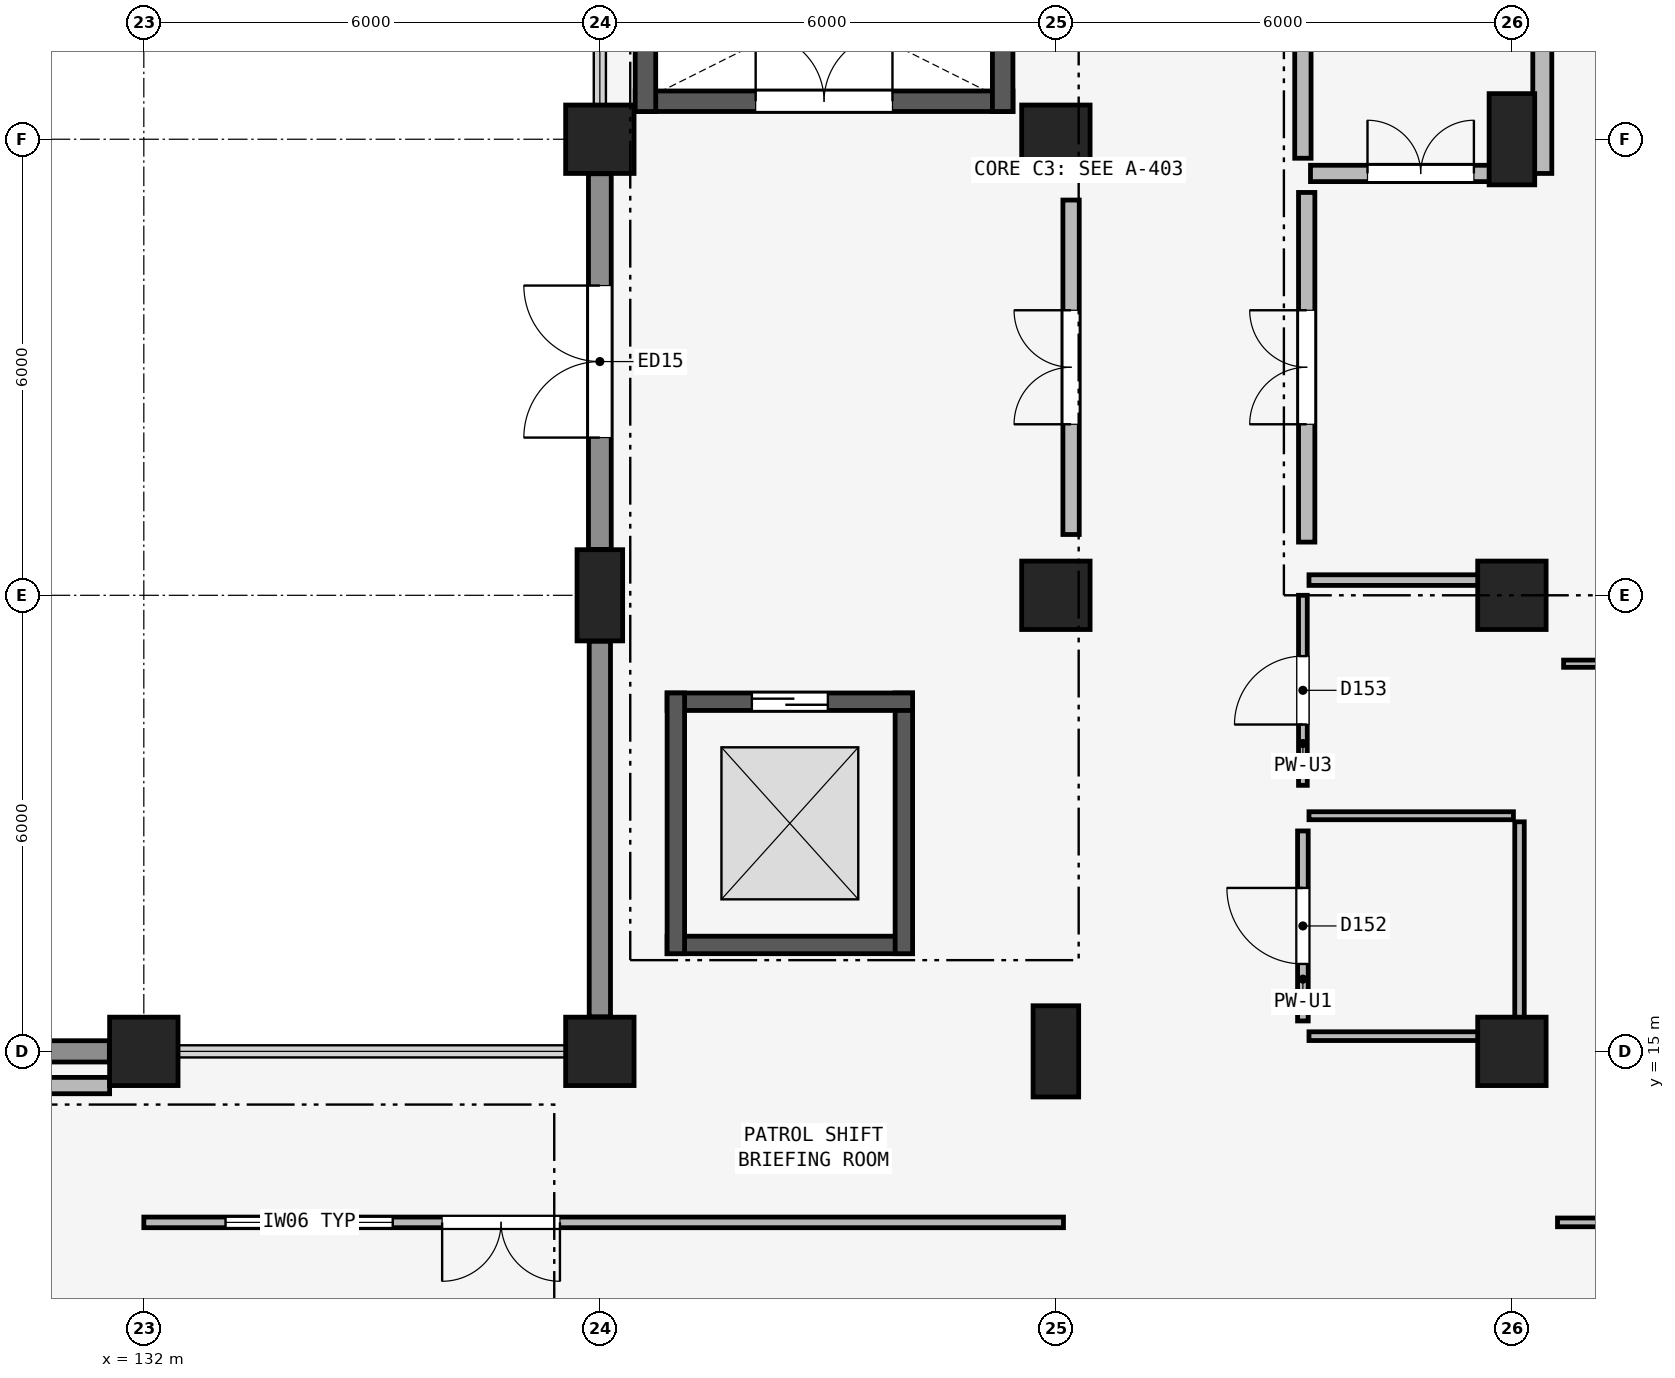
"""IFC4 building model, lengths in metres.
Left out: names, types, materials, properties, quantities, classifications, styles, units other than length and angle.
Written with IfcOpenShell. Run it as: python <this file> out.ifc"""

import sys

from ifc_helpers import new_model, si_unit, direction, frame, frame_2d, origin, origin_2d, place, context, subcontext, project, spatial, rectangle, extrude, element, fill, save


model = new_model("IFC4")
c1 = context("Model", 3, precision=1e-05, world=origin(), true_north=direction((0.0, 1.0)))
c2 = subcontext(c1, "Body", "Model", "MODEL_VIEW")
j1 = project(units=[si_unit("LENGTHUNIT", "METRE"), si_unit("PLANEANGLEUNIT", "RADIAN")], contexts=[c1])
p1 = place(None, origin())
s1 = spatial("IfcSite", under=j1, at=p1, CompositionType="ELEMENT")
p2 = place(p1, origin())
s2 = spatial("IfcBuilding", under=s1, at=p2, CompositionType="ELEMENT")
p3 = place(p2, origin())
s3 = spatial("IfcBuildingStorey", under=s2, at=p3, CompositionType="ELEMENT", Elevation=0.0)
for number, where, z_axis, x_axis in (
    (1, (132.0, 15.0, 0.0), (0.0, 0.0, 1.0), (1.0, 0.0, 0.0)),
    (2, (138.0, 15.0, 0.0), (0.0, 0.0, 1.0), (1.0, 0.0, 0.0)),
):
    element("IfcColumn", number, at=place(p3, frame(where, z_axis=z_axis, x_axis=x_axis)), inside=s3, PredefinedType="COLUMN", context=c2, shape_type="SweptSolid", body=[
        extrude(rectangle(XDim=0.9, YDim=0.9, at=origin_2d()), origin(), (0.0, 0.0, 1.0), 4.8),
    ])
p4 = place(p3, frame((138.0, 21.0, 0.0), z_axis=(0.0, 0.0, 1.0), x_axis=(1.0, 0.0, 0.0)))
e3 = element("IfcColumn", 3, at=p4, inside=s3, PredefinedType="COLUMN", context=c2, shape_type="SweptSolid", body=[
    extrude(rectangle(XDim=0.6, YDim=1.2, at=origin_2d()), origin(), (0.0, 0.0, 1.0), 4.8),
])
p5 = place(p3, frame((138.0, 27.0, 0.0), z_axis=(0.0, 0.0, 1.0), x_axis=(1.0, 0.0, 0.0)))
e4 = element("IfcColumn", 4, at=p5, inside=s3, PredefinedType="COLUMN", context=c2, shape_type="SweptSolid", body=[
    extrude(rectangle(XDim=0.9, YDim=0.9, at=origin_2d()), origin(), (0.0, 0.0, 1.0), 4.8),
])
p6 = place(p3, frame((144.0, 15.0, 0.0), z_axis=(0.0, 0.0, 1.0), x_axis=(1.0, 0.0, 0.0)))
e5 = element("IfcColumn", 5, at=p6, inside=s3, PredefinedType="COLUMN", context=c2, shape_type="SweptSolid", body=[
    extrude(rectangle(XDim=0.6, YDim=1.2, at=origin_2d()), origin(), (0.0, 0.0, 1.0), 4.8),
])
for number, where, z_axis, x_axis in (
    (6, (144.0, 21.0, 0.0), (0.0, 0.0, 1.0), (1.0, 0.0, 0.0)),
    (7, (144.0, 27.0, 0.0), (0.0, 0.0, 1.0), (1.0, 0.0, 0.0)),
    (8, (150.0, 15.0, 0.0), (0.0, 0.0, 1.0), (1.0, 0.0, 0.0)),
    (9, (150.0, 21.0, 0.0), (0.0, 0.0, 1.0), (1.0, 0.0, 0.0)),
):
    element("IfcColumn", number, at=place(p3, frame(where, z_axis=z_axis, x_axis=x_axis)), inside=s3, PredefinedType="COLUMN", context=c2, shape_type="SweptSolid", body=[
        extrude(rectangle(XDim=0.9, YDim=0.9, at=origin_2d()), origin(), (0.0, 0.0, 1.0), 4.8),
    ])
p7 = place(p3, frame((150.0, 27.0, 0.0), z_axis=(0.0, 0.0, 1.0), x_axis=(1.0, 0.0, 0.0)))
e10 = element("IfcColumn", 10, at=p7, inside=s3, PredefinedType="COLUMN", context=c2, shape_type="SweptSolid", body=[
    extrude(rectangle(XDim=0.6, YDim=1.2, at=origin_2d()), origin(), (0.0, 0.0, 1.0), 4.8),
])
p8 = place(p3, frame((126.304, 15.0, 0.0), z_axis=(0.0, 0.0, 1.0), x_axis=(1.0, 0.0, 0.0)))
e11 = element("IfcWall", 11, at=p8, inside=s3, PredefinedType="SOLIDWALL", context=c2, shape_type="SweptSolid", body=[
    extrude(rectangle(XDim=5.242, YDim=0.28, at=frame_2d((2.621, 0.0))), origin(), (0.0, 0.0, 1.0), 4.04),
])
p9 = place(p3, frame((138.0, 15.454, 0.0), z_axis=(0.0, 0.0, 1.0), x_axis=(0.0, 1.0, 0.0)))
e12 = element("IfcWall", 12, at=p9, inside=s3, PredefinedType="SOLIDWALL", context=c2, shape_type="SweptSolid", body=[
    extrude(rectangle(XDim=4.942, YDim=0.28, at=frame_2d((2.471, 0.0))), origin(), (0.0, 0.0, 1.0), 4.083),
])
p10 = place(p3, frame((138.0, 21.604, 0.0), z_axis=(0.0, 0.0, 1.0), x_axis=(0.0, 1.0, 0.0)))
e13 = element("IfcWall", 13, at=p10, inside=s3, PredefinedType="SOLIDWALL", context=c2, shape_type="SweptSolid", body=[
    extrude(rectangle(XDim=4.942, YDim=0.3, at=frame_2d((2.471, 0.0))), origin(), (0.0, 0.0, 1.0), 4.166),
])
p11 = place(p10, frame((1.471, 0.0, 0.0)))
e14 = element("IfcOpeningElement", 14, at=p11, cuts=e13, PredefinedType="OPENING", context=c2, shape_type="SweptSolid", body=[
    extrude(rectangle(XDim=2.0, YDim=2.4, at=frame_2d((1.0, 1.2))), frame((0.0, 0.16, 0.0), z_axis=(0.0, -1.0, 0.0), x_axis=(1.0, 0.0, 0.0)), (0.0, 0.0, 1.0), 0.32),
])
p12 = place(p3, frame((147.3, 21.7, 0.0), z_axis=(0.0, 0.0, 1.0), x_axis=(0.0, 1.0, 0.0)))
e15 = element("IfcWall", 15, at=p12, inside=s3, PredefinedType="PARTITIONING", context=c2, shape_type="SweptSolid", body=[
    extrude(rectangle(XDim=4.6, YDim=0.215, at=frame_2d((2.3, 0.0))), origin(), (0.0, 0.0, 1.0), 4.49),
])
p13 = place(p12, frame((1.55, 0.0, 0.0)))
e16 = element("IfcOpeningElement", 16, at=p13, cuts=e15, PredefinedType="OPENING", context=c2, shape_type="SweptSolid", body=[
    extrude(rectangle(XDim=1.5, YDim=2.15, at=frame_2d((0.75, 1.075))), frame((0.0, 0.117, 0.0), z_axis=(0.0, -1.0, 0.0), x_axis=(1.0, 0.0, 0.0)), (0.0, 0.0, 1.0), 0.235),
])
p14 = place(p3, frame((150.4, 26.55, 0.0), z_axis=(0.0, 0.0, 1.0), x_axis=(0.0, 1.0, 0.0)))
e17 = element("IfcWall", 17, at=p14, inside=s3, PredefinedType="PARTITIONING", context=c2, shape_type="SweptSolid", body=[
    extrude(rectangle(XDim=5.05, YDim=0.25, at=frame_2d((2.525, 0.0))), origin(), (0.0, 0.0, 1.0), 3.89),
])
p15 = place(p14, frame((1.775, 0.0, 0.0)))
e18 = element("IfcOpeningElement", 18, at=p15, cuts=e17, PredefinedType="OPENING", context=c2, shape_type="SweptSolid", body=[
    extrude(rectangle(XDim=1.5, YDim=2.15, at=frame_2d((0.75, 1.075))), frame((0.0, 0.135, 0.0), z_axis=(0.0, -1.0, 0.0), x_axis=(1.0, 0.0, 0.0)), (0.0, 0.0, 1.0), 0.27),
])
p16 = place(p3, frame((138.465, 27.5, 0.0), z_axis=(0.0, 0.0, 1.0), x_axis=(1.0, 0.0, 0.0)))
e19 = element("IfcWall", 19, at=p16, inside=s3, PredefinedType="SHEAR", context=c2, shape_type="SweptSolid", body=[
    extrude(rectangle(XDim=4.97, YDim=0.27, at=frame_2d((2.485, 0.0))), origin(), (0.0, 0.0, 1.0), 4.66),
])
p17 = place(p16, frame((1.585, 0.0, 0.0)))
e20 = element("IfcOpeningElement", 20, at=p17, cuts=e19, PredefinedType="OPENING", context=c2, shape_type="SweptSolid", body=[
    extrude(rectangle(XDim=1.8, YDim=2.2, at=frame_2d((0.9, 1.1))), frame((0.0, 0.145, 0.0), z_axis=(0.0, -1.0, 0.0), x_axis=(1.0, 0.0, 0.0)), (0.0, 0.0, 1.0), 0.29),
])
for number, where, z_axis, x_axis in (
    (21, (143.3, 27.365, 0.0), (0.0, 0.0, 1.0), (0.0, 1.0, 0.0)),
    (22, (138.6, 36.935, 0.0), (0.0, 0.0, 1.0), (0.0, -1.0, 0.0)),
):
    element("IfcWall", number, at=place(p3, frame(where, z_axis=z_axis, x_axis=x_axis)), inside=s3, PredefinedType="SHEAR", context=c2, shape_type="SweptSolid", body=[
        extrude(rectangle(XDim=9.57, YDim=0.27, at=frame_2d((4.785, 0.0))), origin(), (0.0, 0.0, 1.0), 4.66),
    ])
p18 = place(p3, frame((144.2, 21.8, 0.0), z_axis=(0.0, 0.0, 1.0), x_axis=(0.0, 1.0, 0.0)))
e23 = element("IfcWall", 23, at=p18, inside=s3, PredefinedType="PARTITIONING", context=c2, shape_type="SweptSolid", body=[
    extrude(rectangle(XDim=4.4, YDim=0.215, at=frame_2d((2.2, 0.0))), origin(), (0.0, 0.0, 1.0), 4.166),
])
p19 = place(p18, frame((1.45, 0.0, 0.0)))
e24 = element("IfcOpeningElement", 24, at=p19, cuts=e23, PredefinedType="OPENING", context=c2, shape_type="SweptSolid", body=[
    extrude(rectangle(XDim=1.5, YDim=2.15, at=frame_2d((0.75, 1.075))), frame((0.0, 0.117, 0.0), z_axis=(0.0, -1.0, 0.0), x_axis=(1.0, 0.0, 0.0)), (0.0, 0.0, 1.0), 0.235),
])
p20 = place(p3, frame((138.885, 16.4, 0.0), z_axis=(0.0, 0.0, 1.0), x_axis=(1.0, 0.0, 0.0)))
e25 = element("IfcWall", 25, at=p20, inside=s3, PredefinedType="SHEAR", context=c2, shape_type="SweptSolid", body=[
    extrude(rectangle(XDim=3.23, YDim=0.23, at=frame_2d((1.615, 0.0))), origin(), (0.0, 0.0, 1.0), 4.8),
])
p21 = place(p3, frame((142.0, 16.285, 0.0), z_axis=(0.0, 0.0, 1.0), x_axis=(0.0, 1.0, 0.0)))
e26 = element("IfcWall", 26, at=p21, inside=s3, PredefinedType="SHEAR", context=c2, shape_type="SweptSolid", body=[
    extrude(rectangle(XDim=3.43, YDim=0.23, at=frame_2d((1.715, 0.0))), origin(), (0.0, 0.0, 1.0), 4.8),
])
p22 = place(p3, frame((142.115, 19.6, 0.0), z_axis=(0.0, 0.0, 1.0), x_axis=(-1.0, 0.0, 0.0)))
e27 = element("IfcWall", 27, at=p22, inside=s3, PredefinedType="SHEAR", context=c2, shape_type="SweptSolid", body=[
    extrude(rectangle(XDim=3.23, YDim=0.23, at=frame_2d((1.615, 0.0))), origin(), (0.0, 0.0, 1.0), 4.8),
])
p23 = place(p22, frame((1.115, 0.0, 0.0)))
e28 = element("IfcOpeningElement", 28, at=p23, cuts=e27, PredefinedType="OPENING", context=c2, shape_type="SweptSolid", body=[
    extrude(rectangle(XDim=1.0, YDim=2.15, at=frame_2d((0.5, 1.075))), frame((0.0, 0.125, 0.0), z_axis=(0.0, -1.0, 0.0), x_axis=(1.0, 0.0, 0.0)), (0.0, 0.0, 1.0), 0.25),
])
p24 = place(p3, frame((139.0, 19.715, 0.0), z_axis=(0.0, 0.0, 1.0), x_axis=(0.0, -1.0, 0.0)))
e29 = element("IfcWall", 29, at=p24, inside=s3, PredefinedType="SHEAR", context=c2, shape_type="SweptSolid", body=[
    extrude(rectangle(XDim=3.43, YDim=0.23, at=frame_2d((1.715, 0.0))), origin(), (0.0, 0.0, 1.0), 4.8),
])
p25 = place(p3, frame((126.95, 14.55, 0.0), z_axis=(0.0, 0.0, 1.0), x_axis=(1.0, 0.0, 0.0)))
e30 = element("IfcWall", 30, at=p25, inside=s3, PredefinedType="PARTITIONING", context=c2, shape_type="SweptSolid", body=[
    extrude(rectangle(XDim=4.6, YDim=0.215, at=frame_2d((2.3, 0.0))), origin(), (0.0, 0.0, 1.0), 4.49),
])
p26 = place(p3, frame((147.35, 26.55, 0.0), z_axis=(0.0, 0.0, 1.0), x_axis=(1.0, 0.0, 0.0)))
e31 = element("IfcWall", 31, at=p26, inside=s3, PredefinedType="PARTITIONING", context=c2, shape_type="SweptSolid", body=[
    extrude(rectangle(XDim=2.9, YDim=0.215, at=frame_2d((1.45, 0.0))), origin(), (0.0, 0.0, 1.0), 4.166),
])
p27 = place(p26, frame((0.75, 0.0, 0.0)))
e32 = element("IfcOpeningElement", 32, at=p27, cuts=e31, PredefinedType="OPENING", context=c2, shape_type="SweptSolid", body=[
    extrude(rectangle(XDim=1.4, YDim=2.2, at=frame_2d((0.7, 1.1))), frame((0.0, 0.117, 0.0), z_axis=(0.0, -1.0, 0.0), x_axis=(1.0, 0.0, 0.0)), (0.0, 0.0, 1.0), 0.235),
])
p28 = place(p3, frame((147.25, 26.75, 0.0), z_axis=(0.0, 0.0, 1.0), x_axis=(0.0, 1.0, 0.0)))
e33 = element("IfcWall", 33, at=p28, inside=s3, PredefinedType="PARTITIONING", context=c2, shape_type="SweptSolid", body=[
    extrude(rectangle(XDim=10.5, YDim=0.215, at=frame_2d((5.25, 0.0))), origin(), (0.0, 0.0, 1.0), 3.99),
])
p29 = place(p3, frame((147.25, 15.4, 0.0), z_axis=(0.0, 0.0, 1.0), x_axis=(0.0, 1.0, 0.0)))
e34 = element("IfcWall", 34, at=p29, inside=s3, PredefinedType="PARTITIONING", context=c2, shape_type="SweptSolid", body=[
    extrude(rectangle(XDim=2.5, YDim=0.14, at=frame_2d((1.25, 0.0))), origin(), (0.0, 0.0, 1.0), 4.49),
])
p30 = place(p29, frame((0.75, 0.0, 0.0)))
e35 = element("IfcOpeningElement", 35, at=p30, cuts=e34, PredefinedType="OPENING", context=c2, shape_type="SweptSolid", body=[
    extrude(rectangle(XDim=1.0, YDim=2.1, at=frame_2d((0.5, 1.05))), frame((0.0, 0.08, 0.0), z_axis=(0.0, -1.0, 0.0), x_axis=(1.0, 0.0, 0.0)), (0.0, 0.0, 1.0), 0.16),
])
p31 = place(p3, frame((147.25, 18.5, 0.0), z_axis=(0.0, 0.0, 1.0), x_axis=(0.0, 1.0, 0.0)))
e36 = element("IfcWall", 36, at=p31, inside=s3, PredefinedType="PARTITIONING", context=c2, shape_type="SweptSolid", body=[
    extrude(rectangle(XDim=2.5, YDim=0.115, at=frame_2d((1.25, 0.0))), origin(), (0.0, 0.0, 1.0), 3.99),
])
p32 = place(p31, frame((0.8, 0.0, 0.0)))
e37 = element("IfcOpeningElement", 37, at=p32, cuts=e36, PredefinedType="OPENING", context=c2, shape_type="SweptSolid", body=[
    extrude(rectangle(XDim=0.9, YDim=2.1, at=frame_2d((0.45, 1.05))), frame((0.0, 0.067, 0.0), z_axis=(0.0, -1.0, 0.0), x_axis=(1.0, 0.0, 0.0)), (0.0, 0.0, 1.0), 0.135),
])
p33 = place(p3, frame((144.1, 12.75, 0.0), z_axis=(0.0, 0.0, 1.0), x_axis=(-1.0, 0.0, 0.0)))
e38 = element("IfcWall", 38, at=p33, inside=s3, PredefinedType="PARTITIONING", context=c2, shape_type="SweptSolid", body=[
    extrude(rectangle(XDim=12.1, YDim=0.14, at=frame_2d((6.05, 0.0))), origin(), (0.0, 0.0, 1.0), 4.09),
])
p34 = place(p33, frame((6.625, 0.0, 0.0)))
e39 = element("IfcOpeningElement", 39, at=p34, cuts=e38, PredefinedType="OPENING", context=c2, shape_type="SweptSolid", body=[
    extrude(rectangle(XDim=1.55, YDim=2.2, at=frame_2d((0.775, 1.1))), frame((0.0, 0.08, 0.0), z_axis=(0.0, -1.0, 0.0), x_axis=(1.0, 0.0, 0.0)), (0.0, 0.0, 1.0), 0.16),
])
p35 = place(p33, frame((8.825, 0.0, 0.9)))
e40 = element("IfcOpeningElement", 40, at=p35, cuts=e38, PredefinedType="OPENING", context=c2, shape_type="SweptSolid", body=[
    extrude(rectangle(XDim=2.2, YDim=1.4, at=frame_2d((1.1, 0.7))), frame((0.0, 0.08, 0.0), z_axis=(0.0, -1.0, 0.0), x_axis=(1.0, 0.0, 0.0)), (0.0, 0.0, 1.0), 0.16),
])
p36 = place(p3, frame((160.6, 12.75, 0.0), z_axis=(0.0, 0.0, 1.0), x_axis=(-1.0, 0.0, 0.0)))
e41 = element("IfcWall", 41, at=p36, inside=s3, PredefinedType="PARTITIONING", context=c2, shape_type="SweptSolid", body=[
    extrude(rectangle(XDim=10.0, YDim=0.115, at=frame_2d((5.0, 0.0))), origin(), (0.0, 0.0, 1.0), 4.09),
])
p37 = place(p36, frame((4.475, 0.0, 0.0)))
e42 = element("IfcOpeningElement", 42, at=p37, cuts=e41, PredefinedType="OPENING", context=c2, shape_type="SweptSolid", body=[
    extrude(rectangle(XDim=1.05, YDim=2.2, at=frame_2d((0.525, 1.1))), frame((0.0, 0.067, 0.0), z_axis=(0.0, -1.0, 0.0), x_axis=(1.0, 0.0, 0.0)), (0.0, 0.0, 1.0), 0.135),
])
p38 = place(p36, frame((6.175, 0.0, 1.0)))
e43 = element("IfcOpeningElement", 43, at=p38, cuts=e41, PredefinedType="OPENING", context=c2, shape_type="SweptSolid", body=[
    extrude(rectangle(XDim=1.5, YDim=1.2, at=frame_2d((0.75, 0.6))), frame((0.0, 0.067, 0.0), z_axis=(0.0, -1.0, 0.0), x_axis=(1.0, 0.0, 0.0)), (0.0, 0.0, 1.0), 0.135),
])
p39 = place(p3, frame((150.1, 18.02, 0.0), z_axis=(0.0, 0.0, 1.0), x_axis=(0.0, -1.0, 0.0)))
e44 = element("IfcWall", 44, at=p39, inside=s3, PredefinedType="PARTITIONING", context=c2, shape_type="SweptSolid", body=[
    extrude(rectangle(XDim=2.74, YDim=0.125, at=frame_2d((1.37, 0.0))), origin(), (0.0, 0.0, 1.0), 4.083),
])
p40 = place(p3, frame((150.02, 15.2, 0.0), z_axis=(0.0, 0.0, 1.0), x_axis=(-1.0, 0.0, 0.0)))
e45 = element("IfcWall", 45, at=p40, inside=s3, PredefinedType="PARTITIONING", context=c2, shape_type="SweptSolid", body=[
    extrude(rectangle(XDim=2.69, YDim=0.115, at=frame_2d((1.345, 0.0))), origin(), (0.0, 0.0, 1.0), 3.89),
])
p41 = place(p3, frame((147.33, 18.1, 0.0), z_axis=(0.0, 0.0, 1.0), x_axis=(1.0, 0.0, 0.0)))
e46 = element("IfcWall", 46, at=p41, inside=s3, PredefinedType="PARTITIONING", context=c2, shape_type="SweptSolid", body=[
    extrude(rectangle(XDim=2.69, YDim=0.105, at=frame_2d((1.345, 0.0))), origin(), (0.0, 0.0, 1.0), 4.083),
])
p42 = place(p3, frame((147.33, 21.2, 0.0), z_axis=(0.0, 0.0, 1.0), x_axis=(1.0, 0.0, 0.0)))
e47 = element("IfcWall", 47, at=p42, inside=s3, PredefinedType="PARTITIONING", context=c2, shape_type="SweptSolid", body=[
    extrude(rectangle(XDim=2.69, YDim=0.14, at=frame_2d((1.345, 0.0))), origin(), (0.0, 0.0, 1.0), 3.89),
])
p43 = place(p3, frame((150.68, 20.1, 0.0), z_axis=(0.0, 0.0, 1.0), x_axis=(1.0, 0.0, 0.0)))
e48 = element("IfcWall", 48, at=p43, inside=s3, PredefinedType="PARTITIONING", context=c2, shape_type="SweptSolid", body=[
    extrude(rectangle(XDim=9.84, YDim=0.095, at=frame_2d((4.92, 0.0))), origin(), (0.0, 0.0, 1.0), 4.083),
])
p44 = place(p11, origin())
e49 = element("IfcDoor", 49, at=p44, inside=s3, OperationType="DOUBLE_DOOR_SINGLE_SWING", PredefinedType="DOOR", context=c2, shape_type="SweptSolid", body=[
    extrude(rectangle(XDim=2.0, YDim=2.4, at=frame_2d((1.0, 1.2))), frame((0.0, 0.025, 0.0), z_axis=(0.0, -1.0, 0.0), x_axis=(1.0, 0.0, 0.0)), (0.0, 0.0, 1.0), 0.05),
])
fill(e14, e49)
p45 = place(p13, origin())
e50 = element("IfcDoor", 50, at=p45, inside=s3, OperationType="DOUBLE_DOOR_SINGLE_SWING", PredefinedType="DOOR", context=c2, shape_type="SweptSolid", body=[
    extrude(rectangle(XDim=1.5, YDim=2.15, at=frame_2d((0.75, 1.075))), frame((0.0, 0.025, 0.0), z_axis=(0.0, -1.0, 0.0), x_axis=(1.0, 0.0, 0.0)), (0.0, 0.0, 1.0), 0.05),
])
fill(e16, e50)
p46 = place(p17, origin())
e51 = element("IfcDoor", 51, at=p46, inside=s3, OperationType="DOUBLE_DOOR_SINGLE_SWING", PredefinedType="DOOR", context=c2, shape_type="SweptSolid", body=[
    extrude(rectangle(XDim=1.8, YDim=2.2, at=frame_2d((0.9, 1.1))), frame((0.0, 0.025, 0.0), z_axis=(0.0, -1.0, 0.0), x_axis=(1.0, 0.0, 0.0)), (0.0, 0.0, 1.0), 0.05),
])
fill(e20, e51)
p47 = place(p19, origin())
e52 = element("IfcDoor", 52, at=p47, inside=s3, OperationType="DOUBLE_DOOR_SINGLE_SWING", PredefinedType="DOOR", context=c2, shape_type="SweptSolid", body=[
    extrude(rectangle(XDim=1.5, YDim=2.15, at=frame_2d((0.75, 1.075))), frame((0.0, 0.025, 0.0), z_axis=(0.0, -1.0, 0.0), x_axis=(1.0, 0.0, 0.0)), (0.0, 0.0, 1.0), 0.05),
])
fill(e24, e52)
p48 = place(p23, origin())
e53 = element("IfcDoor", 53, at=p48, inside=s3, OperationType="SLIDING_TO_LEFT", PredefinedType="DOOR", context=c2, shape_type="SweptSolid", body=[
    extrude(rectangle(XDim=1.0, YDim=2.15, at=frame_2d((0.5, 1.075))), frame((0.0, 0.025, 0.0), z_axis=(0.0, -1.0, 0.0), x_axis=(1.0, 0.0, 0.0)), (0.0, 0.0, 1.0), 0.05),
])
fill(e28, e53)
p49 = place(p27, origin())
e54 = element("IfcDoor", 54, at=p49, inside=s3, OperationType="DOUBLE_DOOR_SINGLE_SWING", PredefinedType="DOOR", context=c2, shape_type="SweptSolid", body=[
    extrude(rectangle(XDim=1.4, YDim=2.2, at=frame_2d((0.7, 1.1))), frame((0.0, 0.025, 0.0), z_axis=(0.0, -1.0, 0.0), x_axis=(1.0, 0.0, 0.0)), (0.0, 0.0, 1.0), 0.05),
])
fill(e32, e54)
p50 = place(p30, origin())
e55 = element("IfcDoor", 55, at=p50, inside=s3, OperationType="SINGLE_SWING_RIGHT", PredefinedType="DOOR", context=c2, shape_type="SweptSolid", body=[
    extrude(rectangle(XDim=1.0, YDim=2.1, at=frame_2d((0.5, 1.05))), frame((0.0, 0.025, 0.0), z_axis=(0.0, -1.0, 0.0), x_axis=(1.0, 0.0, 0.0)), (0.0, 0.0, 1.0), 0.05),
])
fill(e35, e55)
p51 = place(p32, origin())
e56 = element("IfcDoor", 56, at=p51, inside=s3, OperationType="SINGLE_SWING_LEFT", PredefinedType="DOOR", context=c2, shape_type="SweptSolid", body=[
    extrude(rectangle(XDim=0.9, YDim=2.1, at=frame_2d((0.45, 1.05))), frame((0.0, 0.025, 0.0), z_axis=(0.0, -1.0, 0.0), x_axis=(1.0, 0.0, 0.0)), (0.0, 0.0, 1.0), 0.05),
])
fill(e37, e56)
p52 = place(p34, origin())
e57 = element("IfcDoor", 57, at=p52, inside=s3, OperationType="DOUBLE_DOOR_SINGLE_SWING", PredefinedType="DOOR", context=c2, shape_type="SweptSolid", body=[
    extrude(rectangle(XDim=1.55, YDim=2.2, at=frame_2d((0.775, 1.1))), frame((0.0, 0.025, 0.0), z_axis=(0.0, -1.0, 0.0), x_axis=(1.0, 0.0, 0.0)), (0.0, 0.0, 1.0), 0.05),
])
fill(e39, e57)
p53 = place(p35, origin())
e58 = element("IfcWindow", 58, at=p53, inside=s3, PartitioningType="SINGLE_PANEL", PredefinedType="WINDOW", context=c2, shape_type="SweptSolid", body=[
    extrude(rectangle(XDim=2.2, YDim=1.4, at=frame_2d((1.1, 0.7))), frame((0.0, 0.03, 0.0), z_axis=(0.0, -1.0, 0.0), x_axis=(1.0, 0.0, 0.0)), (0.0, 0.0, 1.0), 0.06),
])
fill(e40, e58)
save(model, sys.argv[1])
